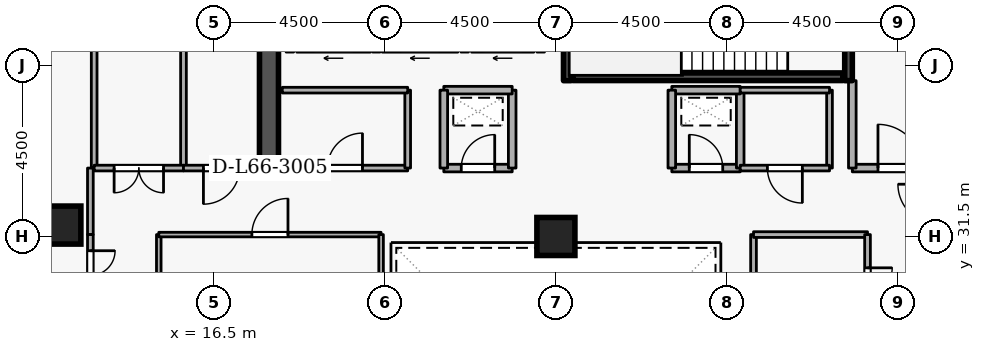
"""IFC4 building model, lengths in metres.
Left out: names, types, materials, properties, quantities, classifications, styles, units other than length and angle.
Written with IfcOpenShell. Run it as: python <this file> out.ifc"""

import sys

from ifc_helpers import new_model, si_unit, direction, frame, frame_2d, origin, origin_2d, place, context, subcontext, project, spatial, rectangle, extrude, element, fill, save


model = new_model("IFC4")
c1 = context("Model", 3, precision=1e-05, world=origin(), true_north=direction((0.0, 1.0)))
c2 = subcontext(c1, "Body", "Model", "MODEL_VIEW")
j1 = project(units=[si_unit("LENGTHUNIT", "METRE"), si_unit("PLANEANGLEUNIT", "RADIAN")], contexts=[c1])
p1 = place(None, origin())
s1 = spatial("IfcSite", under=j1, at=p1, CompositionType="ELEMENT")
p2 = place(p1, origin())
s2 = spatial("IfcBuilding", under=s1, at=p2, CompositionType="ELEMENT")
p3 = place(p2, frame((0.0, 0.0, 247.5)))
s3 = spatial("IfcBuildingStorey", under=s2, at=p3, CompositionType="ELEMENT", Elevation=247.5)
p4 = place(p3, frame((17.95, 33.1, 0.0), z_axis=(0.0, 0.0, 1.0), x_axis=(0.0, 1.0, 0.0)))
e1 = element("IfcWall", 1, at=p4, inside=s3, PredefinedType="SHEAR", context=c2, shape_type="SweptSolid", body=[
    extrude(rectangle(XDim=5.8, YDim=0.5, at=frame_2d((2.9, 0.0))), origin(), (0.0, 0.0, 1.0), 3.6),
])
for number, where, z_axis, x_axis in (
    (2, (12.5, 31.8, 0.0), (0.0, 0.0, 1.0), (1.0, 0.0, 0.0)),
    (3, (25.5, 31.5, 0.0), (0.0, 0.0, 1.0), (1.0, 0.0, 0.0)),
):
    element("IfcColumn", number, at=place(p3, frame(where, z_axis=z_axis, x_axis=x_axis)), inside=s3, PredefinedType="COLUMN", context=c2, shape_type="SweptSolid", body=[
        extrude(rectangle(XDim=1.0, YDim=1.0, at=origin_2d()), origin(), (0.0, 0.0, 1.0), 3.6),
    ])
p5 = place(p3, frame((24.92, 36.45, 0.0), z_axis=(0.0, 0.0, 1.0), x_axis=(-1.0, 0.0, 0.0)))
e4 = element("IfcWall", 4, at=p5, inside=s3, PredefinedType="STANDARD", context=c2, shape_type="SweptSolid", body=[
    extrude(rectangle(XDim=1.64, YDim=0.2, at=frame_2d((0.82, 0.0))), origin(), (0.0, 0.0, 1.0), 3.34),
])
p6 = place(p5, frame((0.31, 0.0, 0.0)))
e5 = element("IfcOpeningElement", 5, at=p6, cuts=e4, PredefinedType="OPENING", context=c2, shape_type="SweptSolid", body=[
    extrude(rectangle(XDim=1.02, YDim=2.06, at=frame_2d((0.51, 1.03))), frame((0.0, 0.11, 0.0), z_axis=(0.0, -1.0, 0.0), x_axis=(1.0, 0.0, 0.0)), (0.0, 0.0, 1.0), 0.22),
])
p7 = place(p3, frame((22.92, 36.45, 0.0), z_axis=(0.0, 0.0, 1.0), x_axis=(-1.0, 0.0, 0.0)))
e6 = element("IfcWall", 6, at=p7, inside=s3, PredefinedType="STANDARD", context=c2, shape_type="SweptSolid", body=[
    extrude(rectangle(XDim=1.99, YDim=0.2, at=frame_2d((0.995, 0.0))), origin(), (0.0, 0.0, 1.0), 3.34),
])
p8 = place(p7, frame((0.485, 0.0, 0.0)))
e7 = element("IfcOpeningElement", 7, at=p8, cuts=e6, PredefinedType="OPENING", context=c2, shape_type="SweptSolid", body=[
    extrude(rectangle(XDim=1.02, YDim=2.06, at=frame_2d((0.51, 1.03))), frame((0.0, 0.11, 0.0), z_axis=(0.0, -1.0, 0.0), x_axis=(1.0, 0.0, 0.0)), (0.0, 0.0, 1.0), 0.22),
])
p9 = place(p3, frame((20.62, 36.45, 0.0), z_axis=(0.0, 0.0, 1.0), x_axis=(-1.0, 0.0, 0.0)))
e8 = element("IfcWall", 8, at=p9, inside=s3, PredefinedType="STANDARD", context=c2, shape_type="SweptSolid", body=[
    extrude(rectangle(XDim=1.94, YDim=0.2, at=frame_2d((0.97, 0.0))), origin(), (0.0, 0.0, 1.0), 3.34),
])
p10 = place(p9, frame((0.46, 0.0, 0.0)))
e9 = element("IfcOpeningElement", 9, at=p10, cuts=e8, PredefinedType="OPENING", context=c2, shape_type="SweptSolid", body=[
    extrude(rectangle(XDim=1.02, YDim=2.06, at=frame_2d((0.51, 1.03))), frame((0.0, 0.11, 0.0), z_axis=(0.0, -1.0, 0.0), x_axis=(1.0, 0.0, 0.0)), (0.0, 0.0, 1.0), 0.22),
])
p11 = place(p3, frame((33.2, 38.95, 0.0), z_axis=(0.0, 0.0, 1.0), x_axis=(0.0, -1.0, 0.0)))
e10 = element("IfcWall", 10, at=p11, inside=s3, PredefinedType="SHEAR", context=c2, shape_type="SweptSolid", body=[
    extrude(rectangle(XDim=3.35, YDim=0.2, at=frame_2d((1.675, 0.0))), origin(), (0.0, 0.0, 1.0), 3.6),
])
p12 = place(p11, frame((1.125, 0.0, 0.0)))
e11 = element("IfcOpeningElement", 11, at=p12, cuts=e10, PredefinedType="OPENING", context=c2, shape_type="SweptSolid", body=[
    extrude(rectangle(XDim=1.1, YDim=2.1, at=frame_2d((0.55, 1.05))), frame((0.0, 0.11, 0.0), z_axis=(0.0, -1.0, 0.0), x_axis=(1.0, 0.0, 0.0)), (0.0, 0.0, 1.0), 0.22),
])
p13 = place(p3, frame((25.8, 35.6, 0.0), z_axis=(0.0, 0.0, 1.0), x_axis=(0.0, 1.0, 0.0)))
e12 = element("IfcWall", 12, at=p13, inside=s3, PredefinedType="SHEAR", context=c2, shape_type="SweptSolid", body=[
    extrude(rectangle(XDim=3.35, YDim=0.2, at=frame_2d((1.675, 0.0))), origin(), (0.0, 0.0, 1.0), 3.6),
])
p14 = place(p3, frame((25.95, 35.703, 0.0), z_axis=(0.0, 0.0, 1.0), x_axis=(1.0, 0.0, 0.0)))
e13 = element("IfcWall", 13, at=p14, inside=s3, PredefinedType="SHEAR", context=c2, shape_type="SweptSolid", body=[
    extrude(rectangle(XDim=7.1, YDim=0.2, at=frame_2d((3.55, 0.0))), origin(), (0.0, 0.0, 1.0), 3.6),
])
p15 = place(p3, frame((33.3, 33.3, 0.0), z_axis=(0.0, 0.0, 1.0), x_axis=(1.0, 0.0, 0.0)))
e14 = element("IfcWall", 14, at=p15, inside=s3, PredefinedType="STANDARD", context=c2, shape_type="SweptSolid", body=[
    extrude(rectangle(XDim=2.5, YDim=0.2, at=frame_2d((1.25, 0.0))), origin(), (0.0, 0.0, 1.0), 3.34),
])
p16 = place(p15, frame((0.675, 0.0, 0.0)))
e15 = element("IfcOpeningElement", 15, at=p16, cuts=e14, PredefinedType="OPENING", context=c2, shape_type="SweptSolid", body=[
    extrude(rectangle(XDim=1.15, YDim=2.1, at=frame_2d((0.575, 1.05))), frame((0.0, 0.11, 0.0), z_axis=(0.0, -1.0, 0.0), x_axis=(1.0, 0.0, 0.0)), (0.0, 0.0, 1.0), 0.22),
])
p17 = place(p3, frame((33.3, 35.6, 0.0), z_axis=(0.0, 0.0, 1.0), x_axis=(0.0, -1.0, 0.0)))
e16 = element("IfcWall", 16, at=p17, inside=s3, PredefinedType="STANDARD", context=c2, shape_type="SweptSolid", body=[
    extrude(rectangle(XDim=2.3, YDim=0.2, at=frame_2d((1.15, 0.0))), origin(), (0.0, 0.0, 1.0), 2.545),
])
p18 = place(p3, frame((22.55, 33.3, 0.0), z_axis=(0.0, 0.0, 1.0), x_axis=(1.0, 0.0, 0.0)))
e17 = element("IfcWall", 17, at=p18, inside=s3, PredefinedType="STANDARD", context=c2, shape_type="SweptSolid", body=[
    extrude(rectangle(XDim=1.8, YDim=0.2, at=frame_2d((0.9, 0.0))), origin(), (0.0, 0.0, 1.0), 3.34),
])
p19 = place(p18, frame((0.46, 0.0, 0.0)))
e18 = element("IfcOpeningElement", 18, at=p19, cuts=e17, PredefinedType="OPENING", context=c2, shape_type="SweptSolid", body=[
    extrude(rectangle(XDim=0.88, YDim=2.04, at=frame_2d((0.44, 1.02))), frame((0.0, 0.11, 0.0), z_axis=(0.0, -1.0, 0.0), x_axis=(1.0, 0.0, 0.0)), (0.0, 0.0, 1.0), 0.22),
])
p20 = place(p3, frame((24.35, 33.3, 0.0), z_axis=(0.0, 0.0, 1.0), x_axis=(0.0, 1.0, 0.0)))
e19 = element("IfcWall", 19, at=p20, inside=s3, PredefinedType="STANDARD", context=c2, shape_type="SweptSolid", body=[
    extrude(rectangle(XDim=2.05, YDim=0.2, at=frame_2d((1.025, 0.0))), origin(), (0.0, 0.0, 1.0), 3.34),
])
p21 = place(p3, frame((24.35, 35.35, 0.0), z_axis=(0.0, 0.0, 1.0), x_axis=(-1.0, 0.0, 0.0)))
e20 = element("IfcWall", 20, at=p21, inside=s3, PredefinedType="STANDARD", context=c2, shape_type="SweptSolid", body=[
    extrude(rectangle(XDim=1.8, YDim=0.2, at=frame_2d((0.9, 0.0))), origin(), (0.0, 0.0, 1.0), 3.34),
])
p22 = place(p3, frame((22.55, 35.35, 0.0), z_axis=(0.0, 0.0, 1.0), x_axis=(0.0, -1.0, 0.0)))
e21 = element("IfcWall", 21, at=p22, inside=s3, PredefinedType="STANDARD", context=c2, shape_type="SweptSolid", body=[
    extrude(rectangle(XDim=2.05, YDim=0.2, at=frame_2d((1.025, 0.0))), origin(), (0.0, 0.0, 1.0), 3.34),
])
p23 = place(p3, frame((28.55, 33.3, 0.0), z_axis=(0.0, 0.0, 1.0), x_axis=(1.0, 0.0, 0.0)))
e22 = element("IfcWall", 22, at=p23, inside=s3, PredefinedType="STANDARD", context=c2, shape_type="SweptSolid", body=[
    extrude(rectangle(XDim=1.8, YDim=0.2, at=frame_2d((0.9, 0.0))), origin(), (0.0, 0.0, 1.0), 3.34),
])
p24 = place(p23, frame((0.46, 0.0, 0.0)))
e23 = element("IfcOpeningElement", 23, at=p24, cuts=e22, PredefinedType="OPENING", context=c2, shape_type="SweptSolid", body=[
    extrude(rectangle(XDim=0.88, YDim=2.04, at=frame_2d((0.44, 1.02))), frame((0.0, 0.11, 0.0), z_axis=(0.0, -1.0, 0.0), x_axis=(1.0, 0.0, 0.0)), (0.0, 0.0, 1.0), 0.22),
])
p25 = place(p3, frame((30.35, 33.3, 0.0), z_axis=(0.0, 0.0, 1.0), x_axis=(0.0, 1.0, 0.0)))
e24 = element("IfcWall", 24, at=p25, inside=s3, PredefinedType="STANDARD", context=c2, shape_type="SweptSolid", body=[
    extrude(rectangle(XDim=2.05, YDim=0.2, at=frame_2d((1.025, 0.0))), origin(), (0.0, 0.0, 1.0), 3.34),
])
p26 = place(p3, frame((30.35, 35.35, 0.0), z_axis=(0.0, 0.0, 1.0), x_axis=(-1.0, 0.0, 0.0)))
e25 = element("IfcWall", 25, at=p26, inside=s3, PredefinedType="STANDARD", context=c2, shape_type="SweptSolid", body=[
    extrude(rectangle(XDim=1.8, YDim=0.2, at=frame_2d((0.9, 0.0))), origin(), (0.0, 0.0, 1.0), 3.34),
])
p27 = place(p3, frame((28.55, 35.35, 0.0), z_axis=(0.0, 0.0, 1.0), x_axis=(0.0, -1.0, 0.0)))
e26 = element("IfcWall", 26, at=p27, inside=s3, PredefinedType="STANDARD", context=c2, shape_type="SweptSolid", body=[
    extrude(rectangle(XDim=2.05, YDim=0.2, at=frame_2d((1.025, 0.0))), origin(), (0.0, 0.0, 1.0), 3.34),
])
p28 = place(p3, frame((18.3, 33.3, 0.0), z_axis=(0.0, 0.0, 1.0), x_axis=(1.0, 0.0, 0.0)))
e27 = element("IfcWall", 27, at=p28, inside=s3, PredefinedType="PARTITIONING", context=c2, shape_type="SweptSolid", body=[
    extrude(rectangle(XDim=3.3, YDim=0.15, at=frame_2d((1.65, 0.0))), origin(), (0.0, 0.0, 1.0), 3.34),
])
p29 = place(p28, frame((1.19, 0.0, 0.0)))
e28 = element("IfcOpeningElement", 28, at=p29, cuts=e27, PredefinedType="OPENING", context=c2, shape_type="SweptSolid", body=[
    extrude(rectangle(XDim=0.92, YDim=2.08, at=frame_2d((0.46, 1.04))), frame((0.0, 0.085, 0.0), z_axis=(0.0, -1.0, 0.0), x_axis=(1.0, 0.0, 0.0)), (0.0, 0.0, 1.0), 0.17),
])
p30 = place(p3, frame((21.6, 33.3, 0.0), z_axis=(0.0, 0.0, 1.0), x_axis=(0.0, 1.0, 0.0)))
e29 = element("IfcWall", 29, at=p30, inside=s3, PredefinedType="PARTITIONING", context=c2, shape_type="SweptSolid", body=[
    extrude(rectangle(XDim=2.05, YDim=0.15, at=frame_2d((1.025, 0.0))), origin(), (0.0, 0.0, 1.0), 3.34),
])
p31 = place(p3, frame((21.6, 35.35, 0.0), z_axis=(0.0, 0.0, 1.0), x_axis=(-1.0, 0.0, 0.0)))
e30 = element("IfcWall", 30, at=p31, inside=s3, PredefinedType="PARTITIONING", context=c2, shape_type="SweptSolid", body=[
    extrude(rectangle(XDim=3.3, YDim=0.15, at=frame_2d((1.65, 0.0))), origin(), (0.0, 0.0, 1.0), 3.34),
])
p32 = place(p3, frame((32.7, 35.35, 0.0), z_axis=(0.0, 0.0, 1.0), x_axis=(0.0, -1.0, 0.0)))
e31 = element("IfcWall", 31, at=p32, inside=s3, PredefinedType="PARTITIONING", context=c2, shape_type="SweptSolid", body=[
    extrude(rectangle(XDim=2.05, YDim=0.15, at=frame_2d((1.025, 0.0))), origin(), (0.0, 0.0, 1.0), 2.545),
])
p33 = place(p3, frame((32.7, 33.3, 0.0), z_axis=(0.0, 0.0, 1.0), x_axis=(-1.0, 0.0, 0.0)))
e32 = element("IfcWall", 32, at=p33, inside=s3, PredefinedType="PARTITIONING", context=c2, shape_type="SweptSolid", body=[
    extrude(rectangle(XDim=2.35, YDim=0.15, at=frame_2d((1.175, 0.0))), origin(), (0.0, 0.0, 1.0), 3.34),
])
p34 = place(p33, frame((0.715, 0.0, 0.0)))
e33 = element("IfcOpeningElement", 33, at=p34, cuts=e32, PredefinedType="OPENING", context=c2, shape_type="SweptSolid", body=[
    extrude(rectangle(XDim=0.92, YDim=2.08, at=frame_2d((0.46, 1.04))), frame((0.0, 0.085, 0.0), z_axis=(0.0, -1.0, 0.0), x_axis=(1.0, 0.0, 0.0)), (0.0, 0.0, 1.0), 0.17),
])
p35 = place(p3, frame((30.35, 35.35, 0.0), z_axis=(0.0, 0.0, 1.0), x_axis=(1.0, 0.0, 0.0)))
e34 = element("IfcWall", 34, at=p35, inside=s3, PredefinedType="PARTITIONING", context=c2, shape_type="SweptSolid", body=[
    extrude(rectangle(XDim=2.35, YDim=0.15, at=frame_2d((1.175, 0.0))), origin(), (0.0, 0.0, 1.0), 3.34),
])
for number, where, z_axis, x_axis in (
    (35, (13.35, 33.3, 0.0), (0.0, 0.0, 1.0), (0.0, 1.0, 0.0)),
    (36, (15.7, 44.72, 0.0), (0.0, 0.0, 1.0), (0.0, -1.0, 0.0)),
):
    element("IfcWall", number, at=place(p3, frame(where, z_axis=z_axis, x_axis=x_axis)), inside=s3, PredefinedType="PARTITIONING", context=c2, shape_type="SweptSolid", body=[
        extrude(rectangle(XDim=11.42, YDim=0.15, at=frame_2d((5.71, 0.0))), origin(), (0.0, 0.0, 1.0), 3.34),
    ])
p36 = place(p3, frame((15.7, 33.3, 0.0), z_axis=(0.0, 0.0, 1.0), x_axis=(-1.0, 0.0, 0.0)))
e37 = element("IfcWall", 37, at=p36, inside=s3, PredefinedType="PARTITIONING", context=c2, shape_type="SweptSolid", body=[
    extrude(rectangle(XDim=2.35, YDim=0.15, at=frame_2d((1.175, 0.0))), origin(), (0.0, 0.0, 1.0), 3.34),
])
p37 = place(p36, frame((0.525, 0.0, 0.0)))
e38 = element("IfcOpeningElement", 38, at=p37, cuts=e37, PredefinedType="OPENING", context=c2, shape_type="SweptSolid", body=[
    extrude(rectangle(XDim=1.3, YDim=2.12, at=frame_2d((0.65, 1.06))), frame((0.0, 0.085, 0.0), z_axis=(0.0, -1.0, 0.0), x_axis=(1.0, 0.0, 0.0)), (0.0, 0.0, 1.0), 0.17),
])
p38 = place(p3, frame((17.7, 33.3, 0.0), z_axis=(0.0, 0.0, 1.0), x_axis=(-1.0, 0.0, 0.0)))
e39 = element("IfcWall", 39, at=p38, inside=s3, PredefinedType="PARTITIONING", context=c2, shape_type="SweptSolid", body=[
    extrude(rectangle(XDim=2.0, YDim=0.15, at=frame_2d((1.0, 0.0))), origin(), (0.0, 0.0, 1.0), 3.34),
])
p39 = place(p38, frame((0.525, 0.0, 0.0)))
e40 = element("IfcOpeningElement", 40, at=p39, cuts=e39, PredefinedType="OPENING", context=c2, shape_type="SweptSolid", body=[
    extrude(rectangle(XDim=0.95, YDim=2.1, at=frame_2d((0.475, 1.05))), frame((0.0, 0.085, 0.0), z_axis=(0.0, -1.0, 0.0), x_axis=(1.0, 0.0, 0.0)), (0.0, 0.0, 1.0), 0.17),
])
p40 = place(p3, frame((13.25, 33.3, 0.0), z_axis=(0.0, 0.0, 1.0), x_axis=(0.0, -1.0, 0.0)))
e41 = element("IfcWall", 41, at=p40, inside=s3, PredefinedType="PARTITIONING", context=c2, shape_type="SweptSolid", body=[
    extrude(rectangle(XDim=1.75, YDim=0.15, at=frame_2d((0.875, 0.0))), origin(), (0.0, 0.0, 1.0), 3.34),
])
p41 = place(p3, frame((13.25, 31.55, 0.0), z_axis=(0.0, 0.0, 1.0), x_axis=(0.0, -1.0, 0.0)))
e42 = element("IfcWall", 42, at=p41, inside=s3, PredefinedType="PARTITIONING", context=c2, shape_type="SweptSolid", body=[
    extrude(rectangle(XDim=2.15, YDim=0.15, at=frame_2d((1.075, 0.0))), origin(), (0.0, 0.0, 1.0), 3.34),
])
p42 = place(p41, frame((0.425, 0.0, 0.0)))
e43 = element("IfcOpeningElement", 43, at=p42, cuts=e42, PredefinedType="OPENING", context=c2, shape_type="SweptSolid", body=[
    extrude(rectangle(XDim=1.3, YDim=2.12, at=frame_2d((0.65, 1.06))), frame((0.0, 0.085, 0.0), z_axis=(0.0, -1.0, 0.0), x_axis=(1.0, 0.0, 0.0)), (0.0, 0.0, 1.0), 0.17),
])
p43 = place(p3, frame((15.05, 26.2, 0.0), z_axis=(0.0, 0.0, 1.0), x_axis=(0.0, 1.0, 0.0)))
e44 = element("IfcWall", 44, at=p43, inside=s3, PredefinedType="PARTITIONING", context=c2, shape_type="SweptSolid", body=[
    extrude(rectangle(XDim=5.35, YDim=0.12, at=frame_2d((2.675, 0.0))), origin(), (0.0, 0.0, 1.0), 3.34),
])
p44 = place(p3, frame((15.05, 31.55, 0.0), z_axis=(0.0, 0.0, 1.0), x_axis=(1.0, 0.0, 0.0)))
e45 = element("IfcWall", 45, at=p44, inside=s3, PredefinedType="PARTITIONING", context=c2, shape_type="SweptSolid", body=[
    extrude(rectangle(XDim=5.85, YDim=0.12, at=frame_2d((2.925, 0.0))), origin(), (0.0, 0.0, 1.0), 3.34),
])
p45 = place(p44, frame((2.45, 0.0, 0.0)))
e46 = element("IfcOpeningElement", 46, at=p45, cuts=e45, PredefinedType="OPENING", context=c2, shape_type="SweptSolid", body=[
    extrude(rectangle(XDim=0.95, YDim=2.1, at=frame_2d((0.475, 1.05))), frame((0.0, 0.07, 0.0), z_axis=(0.0, -1.0, 0.0), x_axis=(1.0, 0.0, 0.0)), (0.0, 0.0, 1.0), 0.14),
])
p46 = place(p3, frame((20.9, 31.55, 0.0), z_axis=(0.0, 0.0, 1.0), x_axis=(0.0, -1.0, 0.0)))
e47 = element("IfcWall", 47, at=p46, inside=s3, PredefinedType="PARTITIONING", context=c2, shape_type="SweptSolid", body=[
    extrude(rectangle(XDim=5.35, YDim=0.12, at=frame_2d((2.675, 0.0))), origin(), (0.0, 0.0, 1.0), 3.34),
])
p47 = place(p3, frame((30.7, 28.5, 0.0), z_axis=(0.0, 0.0, 1.0), x_axis=(0.0, 1.0, 0.0)))
e48 = element("IfcWall", 48, at=p47, inside=s3, PredefinedType="PARTITIONING", context=c2, shape_type="SweptSolid", body=[
    extrude(rectangle(XDim=3.05, YDim=0.15, at=frame_2d((1.525, 0.0))), origin(), (0.0, 0.0, 1.0), 3.34),
])
p48 = place(p3, frame((30.7, 31.55, 0.0), z_axis=(0.0, 0.0, 1.0), x_axis=(1.0, 0.0, 0.0)))
e49 = element("IfcWall", 49, at=p48, inside=s3, PredefinedType="PARTITIONING", context=c2, shape_type="SweptSolid", body=[
    extrude(rectangle(XDim=3.0, YDim=0.15, at=frame_2d((1.5, 0.0))), origin(), (0.0, 0.0, 1.0), 3.34),
])
p49 = place(p3, frame((33.7, 31.55, 0.0), z_axis=(0.0, 0.0, 1.0), x_axis=(0.0, -1.0, 0.0)))
e50 = element("IfcWall", 50, at=p49, inside=s3, PredefinedType="PARTITIONING", context=c2, shape_type="SweptSolid", body=[
    extrude(rectangle(XDim=3.05, YDim=0.15, at=frame_2d((1.525, 0.0))), origin(), (0.0, 0.0, 1.0), 3.34),
])
p50 = place(p49, frame((0.875, 0.0, 0.0)))
e51 = element("IfcOpeningElement", 51, at=p50, cuts=e50, PredefinedType="OPENING", context=c2, shape_type="SweptSolid", body=[
    extrude(rectangle(XDim=1.3, YDim=2.12, at=frame_2d((0.65, 1.06))), frame((0.0, 0.085, 0.0), z_axis=(0.0, -1.0, 0.0), x_axis=(1.0, 0.0, 0.0)), (0.0, 0.0, 1.0), 0.17),
])
p51 = place(p16, origin())
e52 = element("IfcDoor", 52, at=p51, inside=s3, OperationType="SINGLE_SWING_LEFT", PredefinedType="DOOR", context=c2, shape_type="SweptSolid", body=[
    extrude(rectangle(XDim=1.15, YDim=2.1, at=frame_2d((0.575, 1.05))), frame((0.0, 0.025, 0.0), z_axis=(0.0, -1.0, 0.0), x_axis=(1.0, 0.0, 0.0)), (0.0, 0.0, 1.0), 0.05),
])
fill(e15, e52)
p52 = place(p19, origin())
e53 = element("IfcDoor", 53, at=p52, inside=s3, OperationType="SINGLE_SWING_RIGHT", PredefinedType="DOOR", context=c2, shape_type="SweptSolid", body=[
    extrude(rectangle(XDim=0.88, YDim=2.04, at=frame_2d((0.44, 1.02))), frame((0.0, 0.025, 0.0), z_axis=(0.0, -1.0, 0.0), x_axis=(1.0, 0.0, 0.0)), (0.0, 0.0, 1.0), 0.05),
])
fill(e18, e53)
p53 = place(p24, origin())
e54 = element("IfcDoor", 54, at=p53, inside=s3, OperationType="SINGLE_SWING_LEFT", PredefinedType="DOOR", context=c2, shape_type="SweptSolid", body=[
    extrude(rectangle(XDim=0.88, YDim=2.04, at=frame_2d((0.44, 1.02))), frame((0.0, 0.025, 0.0), z_axis=(0.0, -1.0, 0.0), x_axis=(1.0, 0.0, 0.0)), (0.0, 0.0, 1.0), 0.05),
])
fill(e23, e54)
p54 = place(p29, origin())
e55 = element("IfcDoor", 55, at=p54, inside=s3, OperationType="SINGLE_SWING_RIGHT", PredefinedType="DOOR", context=c2, shape_type="SweptSolid", body=[
    extrude(rectangle(XDim=0.92, YDim=2.08, at=frame_2d((0.46, 1.04))), frame((0.0, 0.025, 0.0), z_axis=(0.0, -1.0, 0.0), x_axis=(1.0, 0.0, 0.0)), (0.0, 0.0, 1.0), 0.05),
])
fill(e28, e55)
p55 = place(p34, origin())
e56 = element("IfcDoor", 56, at=p55, inside=s3, OperationType="SINGLE_SWING_LEFT", PredefinedType="DOOR", context=c2, shape_type="SweptSolid", body=[
    extrude(rectangle(XDim=0.92, YDim=2.08, at=frame_2d((0.46, 1.04))), frame((0.0, 0.025, 0.0), z_axis=(0.0, -1.0, 0.0), x_axis=(1.0, 0.0, 0.0)), (0.0, 0.0, 1.0), 0.05),
])
fill(e33, e56)
p56 = place(p37, origin())
e57 = element("IfcDoor", 57, at=p56, inside=s3, OperationType="DOUBLE_DOOR_SINGLE_SWING", PredefinedType="DOOR", context=c2, shape_type="SweptSolid", body=[
    extrude(rectangle(XDim=1.3, YDim=2.12, at=frame_2d((0.65, 1.06))), frame((0.0, 0.025, 0.0), z_axis=(0.0, -1.0, 0.0), x_axis=(1.0, 0.0, 0.0)), (0.0, 0.0, 1.0), 0.05),
])
fill(e38, e57)
p57 = place(p39, origin())
e58 = element("IfcDoor", 58, at=p57, inside=s3, OperationType="SINGLE_SWING_RIGHT", PredefinedType="DOOR", context=c2, shape_type="SweptSolid", body=[
    extrude(rectangle(XDim=0.95, YDim=2.1, at=frame_2d((0.475, 1.05))), frame((0.0, 0.025, 0.0), z_axis=(0.0, -1.0, 0.0), x_axis=(1.0, 0.0, 0.0)), (0.0, 0.0, 1.0), 0.05),
])
fill(e40, e58)
p58 = place(p42, origin())
e59 = element("IfcDoor", 59, at=p58, inside=s3, OperationType="DOUBLE_DOOR_SINGLE_SWING", PredefinedType="DOOR", context=c2, shape_type="SweptSolid", body=[
    extrude(rectangle(XDim=1.3, YDim=2.12, at=frame_2d((0.65, 1.06))), frame((0.0, 0.025, 0.0), z_axis=(0.0, -1.0, 0.0), x_axis=(1.0, 0.0, 0.0)), (0.0, 0.0, 1.0), 0.05),
])
fill(e43, e59)
p59 = place(p45, origin())
e60 = element("IfcDoor", 60, at=p59, inside=s3, OperationType="SINGLE_SWING_RIGHT", PredefinedType="DOOR", context=c2, shape_type="SweptSolid", body=[
    extrude(rectangle(XDim=0.95, YDim=2.1, at=frame_2d((0.475, 1.05))), frame((0.0, 0.025, 0.0), z_axis=(0.0, -1.0, 0.0), x_axis=(1.0, 0.0, 0.0)), (0.0, 0.0, 1.0), 0.05),
])
fill(e46, e60)
p60 = place(p50, origin())
e61 = element("IfcDoor", 61, at=p60, inside=s3, OperationType="DOUBLE_DOOR_SINGLE_SWING", PredefinedType="DOOR", context=c2, shape_type="SweptSolid", body=[
    extrude(rectangle(XDim=1.3, YDim=2.12, at=frame_2d((0.65, 1.06))), frame((0.0, 0.025, 0.0), z_axis=(0.0, -1.0, 0.0), x_axis=(1.0, 0.0, 0.0)), (0.0, 0.0, 1.0), 0.05),
])
fill(e51, e61)
save(model, sys.argv[1])
